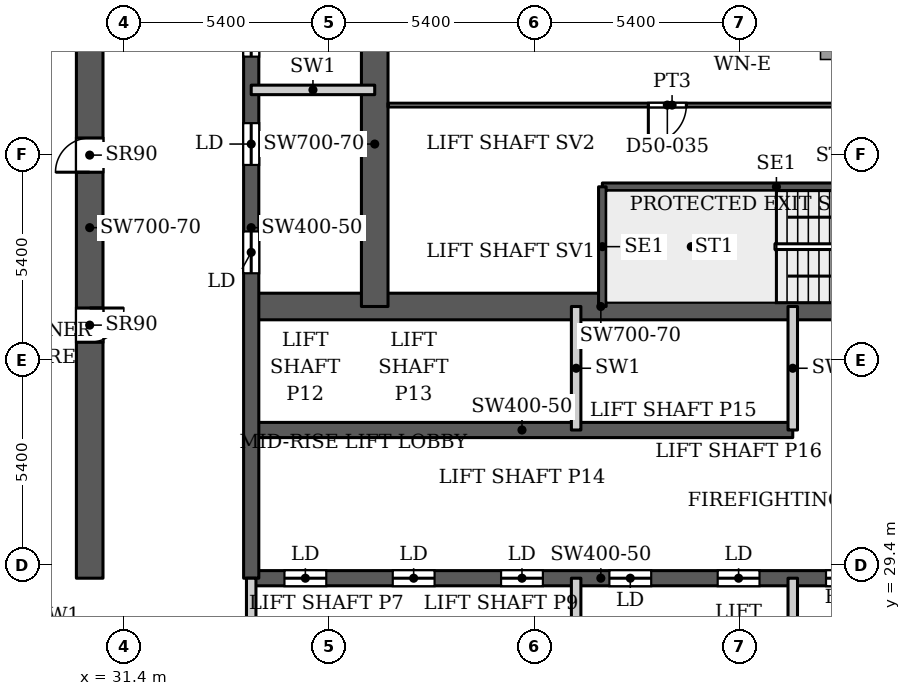
"""IFC4 building model, lengths in metres.
Left out: names, types, materials, properties, quantities, classifications, styles, units other than length and angle.
Written with IfcOpenShell. Run it as: python <this file> out.ifc"""

import sys

from ifc_helpers import new_model, si_unit, direction, frame, frame_2d, origin, place, context, subcontext, project, spatial, rectangle, extrude, source, transform, mapped, element, fill, save


model = new_model("IFC4")
c1 = context("Model", 3, precision=1e-05, world=origin(), true_north=direction((0.0, 1.0)))
c2 = subcontext(c1, "Body", "Model", "MODEL_VIEW")
j1 = project(units=[si_unit("LENGTHUNIT", "METRE"), si_unit("PLANEANGLEUNIT", "RADIAN")], contexts=[c1])
p1 = place(None, origin())
s1 = spatial("IfcSite", under=j1, at=p1, CompositionType="ELEMENT")
p2 = place(p1, origin())
s2 = spatial("IfcBuilding", under=s1, at=p2, CompositionType="ELEMENT")
p3 = place(p2, frame((0.0, 0.0, 220.1)))
s3 = spatial("IfcBuildingStorey", under=s2, at=p3, CompositionType="ELEMENT", Elevation=220.1)
p4 = place(p3, frame((34.75, 29.05, 0.0), z_axis=(0.0, 0.0, 1.0), x_axis=(1.0, 0.0, 0.0)))
e1 = element("IfcWall", 1, at=p4, inside=s3, PredefinedType="SHEAR", context=c2, shape_type="SweptSolid", body=[
    extrude(rectangle(XDim=18.4, YDim=0.4, at=frame_2d((9.2, 0.0))), origin(), (0.0, 0.0, 1.0), 3.9),
])
p5 = place(p4, frame((0.875, 0.0, 0.0)))
e2 = element("IfcOpeningElement", 2, at=p5, cuts=e1, PredefinedType="OPENING", context=c2, shape_type="SweptSolid", body=[
    extrude(rectangle(XDim=1.1, YDim=2.2, at=frame_2d((0.55, 1.1))), frame((0.0, 0.21, 0.0), z_axis=(0.0, -1.0, 0.0), x_axis=(1.0, 0.0, 0.0)), (0.0, 0.0, 1.0), 0.42),
])
p6 = place(p4, frame((3.725, 0.0, 0.0)))
e3 = element("IfcOpeningElement", 3, at=p6, cuts=e1, PredefinedType="OPENING", context=c2, shape_type="SweptSolid", body=[
    extrude(rectangle(XDim=1.1, YDim=2.2, at=frame_2d((0.55, 1.1))), frame((0.0, 0.21, 0.0), z_axis=(0.0, -1.0, 0.0), x_axis=(1.0, 0.0, 0.0)), (0.0, 0.0, 1.0), 0.42),
])
p7 = place(p4, frame((6.575, 0.0, 0.0)))
e4 = element("IfcOpeningElement", 4, at=p7, cuts=e1, PredefinedType="OPENING", context=c2, shape_type="SweptSolid", body=[
    extrude(rectangle(XDim=1.1, YDim=2.2, at=frame_2d((0.55, 1.1))), frame((0.0, 0.21, 0.0), z_axis=(0.0, -1.0, 0.0), x_axis=(1.0, 0.0, 0.0)), (0.0, 0.0, 1.0), 0.42),
])
p8 = place(p4, frame((9.425, 0.0, 0.0)))
e5 = element("IfcOpeningElement", 5, at=p8, cuts=e1, PredefinedType="OPENING", context=c2, shape_type="SweptSolid", body=[
    extrude(rectangle(XDim=1.1, YDim=2.2, at=frame_2d((0.55, 1.1))), frame((0.0, 0.21, 0.0), z_axis=(0.0, -1.0, 0.0), x_axis=(1.0, 0.0, 0.0)), (0.0, 0.0, 1.0), 0.42),
])
p9 = place(p4, frame((12.275, 0.0, 0.0)))
e6 = element("IfcOpeningElement", 6, at=p9, cuts=e1, PredefinedType="OPENING", context=c2, shape_type="SweptSolid", body=[
    extrude(rectangle(XDim=1.1, YDim=2.2, at=frame_2d((0.55, 1.1))), frame((0.0, 0.21, 0.0), z_axis=(0.0, -1.0, 0.0), x_axis=(1.0, 0.0, 0.0)), (0.0, 0.0, 1.0), 0.42),
])
p10 = place(p4, frame((15.125, 0.0, 0.0)))
e7 = element("IfcOpeningElement", 7, at=p10, cuts=e1, PredefinedType="OPENING", context=c2, shape_type="SweptSolid", body=[
    extrude(rectangle(XDim=1.1, YDim=2.2, at=frame_2d((0.55, 1.1))), frame((0.0, 0.21, 0.0), z_axis=(0.0, -1.0, 0.0), x_axis=(1.0, 0.0, 0.0)), (0.0, 0.0, 1.0), 0.42),
])
p11 = place(p3, frame((34.75, 32.95, 0.0), z_axis=(0.0, 0.0, 1.0), x_axis=(1.0, 0.0, 0.0)))
e8 = element("IfcWall", 8, at=p11, inside=s3, PredefinedType="SHEAR", context=c2, shape_type="SweptSolid", body=[
    extrude(rectangle(XDim=14.25, YDim=0.4, at=frame_2d((7.125, 0.0))), origin(), (0.0, 0.0, 1.0), 3.9),
])
p12 = place(p3, frame((34.75, 36.2, 0.0), z_axis=(0.0, 0.0, 1.0), x_axis=(1.0, 0.0, 0.0)))
e9 = element("IfcWall", 9, at=p12, inside=s3, PredefinedType="SHEAR", context=c2, shape_type="SweptSolid", body=[
    extrude(rectangle(XDim=18.4, YDim=0.7, at=frame_2d((9.2, 0.0))), origin(), (0.0, 0.0, 1.0), 3.9),
])
p13 = place(p12, frame((16.9, 0.0, 0.0)))
e10 = element("IfcOpeningElement", 10, at=p13, cuts=e9, PredefinedType="OPENING", context=c2, shape_type="SweptSolid", body=[
    extrude(rectangle(XDim=1.0, YDim=2.2, at=frame_2d((0.5, 1.1))), frame((0.0, 0.36, 0.0), z_axis=(0.0, -1.0, 0.0), x_axis=(1.0, 0.0, 0.0)), (0.0, 0.0, 1.0), 0.72),
])
p14 = place(p3, frame((34.75, 29.05, 0.0), z_axis=(0.0, 0.0, 1.0), x_axis=(0.0, 1.0, 0.0)))
e11 = element("IfcWall", 11, at=p14, inside=s3, PredefinedType="SHEAR", context=c2, shape_type="SweptSolid", body=[
    extrude(rectangle(XDim=18.45, YDim=0.4, at=frame_2d((9.225, 0.0))), origin(), (0.0, 0.0, 1.0), 3.9),
])
p15 = place(p14, frame((8.025, 0.0, 0.0)))
e12 = element("IfcOpeningElement", 12, at=p15, cuts=e11, PredefinedType="OPENING", context=c2, shape_type="SweptSolid", body=[
    extrude(rectangle(XDim=1.1, YDim=2.2, at=frame_2d((0.55, 1.1))), frame((0.0, 0.21, 0.0), z_axis=(0.0, -1.0, 0.0), x_axis=(1.0, 0.0, 0.0)), (0.0, 0.0, 1.0), 0.42),
])
p16 = place(p14, frame((10.875, 0.0, 0.0)))
e13 = element("IfcOpeningElement", 13, at=p16, cuts=e11, PredefinedType="OPENING", context=c2, shape_type="SweptSolid", body=[
    extrude(rectangle(XDim=1.1, YDim=2.2, at=frame_2d((0.55, 1.1))), frame((0.0, 0.21, 0.0), z_axis=(0.0, -1.0, 0.0), x_axis=(1.0, 0.0, 0.0)), (0.0, 0.0, 1.0), 0.42),
])
p17 = place(p14, frame((13.725, 0.0, 0.0)))
e14 = element("IfcOpeningElement", 14, at=p17, cuts=e11, PredefinedType="OPENING", context=c2, shape_type="SweptSolid", body=[
    extrude(rectangle(XDim=1.1, YDim=2.2, at=frame_2d((0.55, 1.1))), frame((0.0, 0.21, 0.0), z_axis=(0.0, -1.0, 0.0), x_axis=(1.0, 0.0, 0.0)), (0.0, 0.0, 1.0), 0.42),
])
p18 = place(p14, frame((15.95, 0.0, 0.0)))
e15 = element("IfcOpeningElement", 15, at=p18, cuts=e11, PredefinedType="OPENING", context=c2, shape_type="SweptSolid", body=[
    extrude(rectangle(XDim=1.1, YDim=2.2, at=frame_2d((0.55, 1.1))), frame((0.0, 0.21, 0.0), z_axis=(0.0, -1.0, 0.0), x_axis=(1.0, 0.0, 0.0)), (0.0, 0.0, 1.0), 0.42),
])
p19 = place(p3, frame((38.0, 36.2, 0.0), z_axis=(0.0, 0.0, 1.0), x_axis=(0.0, 1.0, 0.0)))
e16 = element("IfcWall", 16, at=p19, inside=s3, PredefinedType="SHEAR", context=c2, shape_type="SweptSolid", body=[
    extrude(rectangle(XDim=8.55, YDim=0.7, at=frame_2d((4.275, 0.0))), origin(), (0.0, 0.0, 1.0), 3.9),
])
p20 = place(p3, frame((30.5, 29.05, 0.0), z_axis=(0.0, 0.0, 1.0), x_axis=(0.0, 1.0, 0.0)))
e17 = element("IfcWall", 17, at=p20, inside=s3, PredefinedType="SHEAR", context=c2, shape_type="SweptSolid", body=[
    extrude(rectangle(XDim=18.45, YDim=0.7, at=frame_2d((9.225, 0.0))), origin(), (0.0, 0.0, 1.0), 3.9),
])
p21 = place(p20, frame((6.21, 0.0, 0.0)))
e18 = element("IfcOpeningElement", 18, at=p21, cuts=e17, PredefinedType="OPENING", context=c2, shape_type="SweptSolid", body=[
    extrude(rectangle(XDim=0.9, YDim=2.2, at=frame_2d((0.45, 1.1))), frame((0.0, 0.36, 0.0), z_axis=(0.0, -1.0, 0.0), x_axis=(1.0, 0.0, 0.0)), (0.0, 0.0, 1.0), 0.72),
])
p22 = place(p20, frame((10.684, 0.0, 0.0)))
e19 = element("IfcOpeningElement", 19, at=p22, cuts=e17, PredefinedType="OPENING", context=c2, shape_type="SweptSolid", body=[
    extrude(rectangle(XDim=0.9, YDim=2.2, at=frame_2d((0.45, 1.1))), frame((0.0, 0.36, 0.0), z_axis=(0.0, -1.0, 0.0), x_axis=(1.0, 0.0, 0.0)), (0.0, 0.0, 1.0), 0.72),
])
p23 = place(p3, frame((29.712, 26.072, 0.0), z_axis=(0.0, 0.0, 1.0), x_axis=(-0.511028049012, 0.859564036662, 0.0)))
e20 = element("IfcWall", 20, at=p23, inside=s3, PredefinedType="SOLIDWALL", context=c2, shape_type="SweptSolid", body=[
    extrude(rectangle(XDim=4.634, YDim=0.25, at=frame_2d((2.317, 0.0))), origin(), (0.0, 0.0, 1.0), 3.217),
])
p24 = place(p3, frame((27.195, 31.969, 0.0), z_axis=(0.0, 0.0, 1.0), x_axis=(0.052559748861, 0.998617781135, 0.0)))
e21 = element("IfcWall", 21, at=p24, inside=s3, PredefinedType="SOLIDWALL", context=c2, shape_type="SweptSolid", body=[
    extrude(rectangle(XDim=55.972, YDim=0.25, at=frame_2d((27.986, 0.0))), origin(), (0.0, 0.0, 1.0), 3.75),
])
p25 = place(p3, frame((43.99, 39.35, 0.0), z_axis=(0.0, 0.0, 1.0), x_axis=(1.0, 0.0, 0.0)))
e22 = element("IfcWall", 22, at=p25, inside=s3, PredefinedType="SHEAR", context=c2, shape_type="SweptSolid", body=[
    extrude(rectangle(XDim=9.16, YDim=0.2, at=frame_2d((4.58, 0.0))), origin(), (0.0, 0.0, 1.0), 3.9),
])
p26 = place(p3, frame((43.99, 36.2, 0.0), z_axis=(0.0, 0.0, 1.0), x_axis=(0.0, 1.0, 0.0)))
e23 = element("IfcWall", 23, at=p26, inside=s3, PredefinedType="SHEAR", context=c2, shape_type="SweptSolid", body=[
    extrude(rectangle(XDim=3.15, YDim=0.2, at=frame_2d((1.575, 0.0))), origin(), (0.0, 0.0, 1.0), 3.9),
])
for number, where, z_axis, x_axis in (
    (24, (34.75, 25.8, 0.0), (0.0, 0.0, 1.0), (0.0, 1.0, 0.0)),
    (25, (43.3, 25.8, 0.0), (0.0, 0.0, 1.0), (0.0, 1.0, 0.0)),
    (26, (43.3, 32.95, 0.0), (0.0, 0.0, 1.0), (0.0, 1.0, 0.0)),
    (27, (49.0, 25.8, 0.0), (0.0, 0.0, 1.0), (0.0, 1.0, 0.0)),
    (28, (49.0, 32.95, 0.0), (0.0, 0.0, 1.0), (0.0, 1.0, 0.0)),
    (29, (34.75, 41.9, 0.0), (0.0, 0.0, 1.0), (1.0, 0.0, 0.0)),
):
    element("IfcWall", number, at=place(p3, frame(where, z_axis=z_axis, x_axis=x_axis)), inside=s3, PredefinedType="PARTITIONING", context=c2, shape_type="SweptSolid", body=[
        extrude(rectangle(XDim=3.25, YDim=0.25, at=frame_2d((1.625, 0.0))), origin(), (0.0, 0.0, 1.0), 3.9),
    ])
p27 = place(p3, frame((38.349, 41.5, 0.0), z_axis=(0.0, 0.0, 1.0), x_axis=(1.0, 0.0, 0.0)))
e30 = element("IfcWall", 30, at=p27, inside=s3, PredefinedType="PARTITIONING", context=c2, shape_type="SweptSolid", body=[
    extrude(rectangle(XDim=14.951, YDim=0.1, at=frame_2d((7.476, 0.0))), origin(), (0.0, 0.0, 1.0), 3.6),
])
p28 = place(p27, frame((6.851, 0.0, 0.0)))
e31 = element("IfcOpeningElement", 31, at=p28, cuts=e30, PredefinedType="OPENING", context=c2, shape_type="SweptSolid", body=[
    extrude(rectangle(XDim=1.0, YDim=2.1, at=frame_2d((0.5, 1.05))), frame((0.0, 0.06, 0.0), z_axis=(0.0, -1.0, 0.0), x_axis=(1.0, 0.0, 0.0)), (0.0, 0.0, 1.0), 0.12),
])
m1 = source(origin(), c2, "Body", "SweptSolid", [
    extrude(rectangle(XDim=1.1, YDim=2.2, at=frame_2d((0.55, 1.1))), frame((0.0, 0.025, 0.0), z_axis=(0.0, -1.0, 0.0), x_axis=(1.0, 0.0, 0.0)), (0.0, 0.0, 1.0), 0.05),
])
p29 = place(p5, origin())
e32 = element("IfcDoor", 32, at=p29, inside=s3, OperationType="SLIDING_TO_LEFT", PredefinedType="DOOR", context=c2, shape_type="MappedRepresentation", body=[
    mapped(m1, transform((0.0, 0.0, 0.0), x_axis=(1.0, 0.0, 0.0), y_axis=(0.0, 1.0, 0.0), z_axis=(0.0, 0.0, 1.0), scale=1.0)),
])
fill(e2, e32)
p30 = place(p6, origin())
e33 = element("IfcDoor", 33, at=p30, inside=s3, OperationType="SLIDING_TO_LEFT", PredefinedType="DOOR", context=c2, shape_type="MappedRepresentation", body=[
    mapped(m1, transform((0.0, 0.0, 0.0), x_axis=(1.0, 0.0, 0.0), y_axis=(0.0, 1.0, 0.0), z_axis=(0.0, 0.0, 1.0), scale=1.0)),
])
fill(e3, e33)
p31 = place(p7, origin())
e34 = element("IfcDoor", 34, at=p31, inside=s3, OperationType="SLIDING_TO_LEFT", PredefinedType="DOOR", context=c2, shape_type="MappedRepresentation", body=[
    mapped(m1, transform((0.0, 0.0, 0.0), x_axis=(1.0, 0.0, 0.0), y_axis=(0.0, 1.0, 0.0), z_axis=(0.0, 0.0, 1.0), scale=1.0)),
])
fill(e4, e34)
p32 = place(p8, origin())
e35 = element("IfcDoor", 35, at=p32, inside=s3, OperationType="SLIDING_TO_LEFT", PredefinedType="DOOR", context=c2, shape_type="MappedRepresentation", body=[
    mapped(m1, transform((0.0, 0.0, 0.0), x_axis=(1.0, 0.0, 0.0), y_axis=(0.0, 1.0, 0.0), z_axis=(0.0, 0.0, 1.0), scale=1.0)),
])
fill(e5, e35)
p33 = place(p9, origin())
e36 = element("IfcDoor", 36, at=p33, inside=s3, OperationType="SLIDING_TO_LEFT", PredefinedType="DOOR", context=c2, shape_type="MappedRepresentation", body=[
    mapped(m1, transform((0.0, 0.0, 0.0), x_axis=(1.0, 0.0, 0.0), y_axis=(0.0, 1.0, 0.0), z_axis=(0.0, 0.0, 1.0), scale=1.0)),
])
fill(e6, e36)
p34 = place(p15, origin())
e37 = element("IfcDoor", 37, at=p34, inside=s3, OperationType="SLIDING_TO_LEFT", PredefinedType="DOOR", context=c2, shape_type="MappedRepresentation", body=[
    mapped(m1, transform((0.0, 0.0, 0.0), x_axis=(1.0, 0.0, 0.0), y_axis=(0.0, 1.0, 0.0), z_axis=(0.0, 0.0, 1.0), scale=1.0)),
])
fill(e12, e37)
p35 = place(p16, origin())
e38 = element("IfcDoor", 38, at=p35, inside=s3, OperationType="SLIDING_TO_LEFT", PredefinedType="DOOR", context=c2, shape_type="MappedRepresentation", body=[
    mapped(m1, transform((0.0, 0.0, 0.0), x_axis=(1.0, 0.0, 0.0), y_axis=(0.0, 1.0, 0.0), z_axis=(0.0, 0.0, 1.0), scale=1.0)),
])
fill(e13, e38)
p36 = place(p17, origin())
e39 = element("IfcDoor", 39, at=p36, inside=s3, OperationType="SLIDING_TO_LEFT", PredefinedType="DOOR", context=c2, shape_type="MappedRepresentation", body=[
    mapped(m1, transform((0.0, 0.0, 0.0), x_axis=(1.0, 0.0, 0.0), y_axis=(0.0, 1.0, 0.0), z_axis=(0.0, 0.0, 1.0), scale=1.0)),
])
fill(e14, e39)
p37 = place(p10, origin())
e40 = element("IfcDoor", 40, at=p37, inside=s3, OperationType="SLIDING_TO_LEFT", PredefinedType="DOOR", context=c2, shape_type="MappedRepresentation", body=[
    mapped(m1, transform((0.0, 0.0, 0.0), x_axis=(1.0, 0.0, 0.0), y_axis=(0.0, 1.0, 0.0), z_axis=(0.0, 0.0, 1.0), scale=1.0)),
])
fill(e7, e40)
m2 = source(origin(), c2, "Body", "SweptSolid", [
    extrude(rectangle(XDim=0.9, YDim=2.2, at=frame_2d((0.45, 1.1))), frame((0.0, 0.025, 0.0), z_axis=(0.0, -1.0, 0.0), x_axis=(1.0, 0.0, 0.0)), (0.0, 0.0, 1.0), 0.05),
])
p38 = place(p21, origin())
e41 = element("IfcDoor", 41, at=p38, inside=s3, OperationType="SINGLE_SWING_RIGHT", PredefinedType="DOOR", context=c2, shape_type="MappedRepresentation", body=[
    mapped(m2, transform((0.0, 0.0, 0.0), x_axis=(1.0, 0.0, 0.0), y_axis=(0.0, 1.0, 0.0), z_axis=(0.0, 0.0, 1.0), scale=1.0)),
])
fill(e18, e41)
p39 = place(p22, origin())
e42 = element("IfcDoor", 42, at=p39, inside=s3, OperationType="SINGLE_SWING_LEFT", PredefinedType="DOOR", context=c2, shape_type="MappedRepresentation", body=[
    mapped(m2, transform((0.0, 0.0, 0.0), x_axis=(1.0, 0.0, 0.0), y_axis=(0.0, 1.0, 0.0), z_axis=(0.0, 0.0, 1.0), scale=1.0)),
])
fill(e19, e42)
m3 = source(origin(), c2, "Body", "SweptSolid", [
    extrude(rectangle(XDim=1.0, YDim=2.1, at=frame_2d((0.5, 1.05))), frame((0.0, 0.025, 0.0), z_axis=(0.0, -1.0, 0.0), x_axis=(1.0, 0.0, 0.0)), (0.0, 0.0, 1.0), 0.05),
])
p40 = place(p28, origin())
e43 = element("IfcDoor", 43, at=p40, inside=s3, OperationType="SINGLE_SWING_RIGHT", PredefinedType="DOOR", context=c2, shape_type="MappedRepresentation", body=[
    mapped(m3, transform((0.0, 0.0, 0.0), x_axis=(1.0, 0.0, 0.0), y_axis=(0.0, 1.0, 0.0), z_axis=(0.0, 0.0, 1.0), scale=1.0)),
])
fill(e31, e43)
save(model, sys.argv[1])
